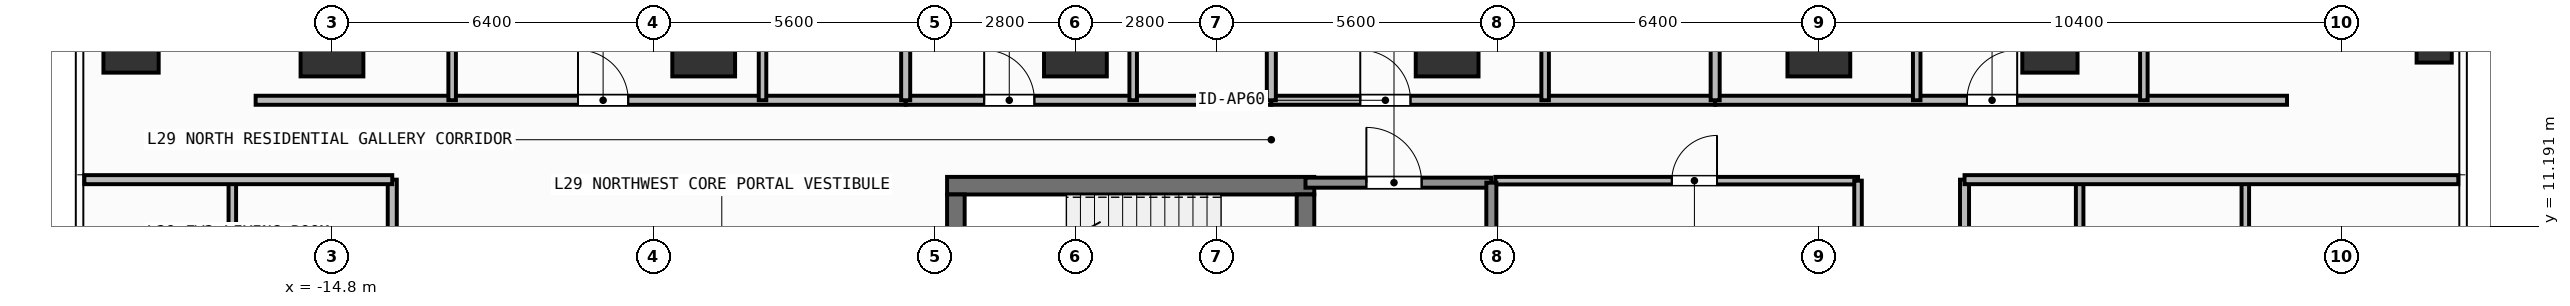
"""IFC4 building model, lengths in metres.
Left out: names, types, materials, properties, quantities, classifications, styles, units other than length and angle.
Written with IfcOpenShell. Run it as: python <this file> out.ifc"""

import sys

from ifc_helpers import new_model, si_unit, direction, frame, frame_2d, origin, origin_2d, place, context, subcontext, project, spatial, rectangle, hollow_rectangle, extrude, element, fill, save


model = new_model("IFC4")
c1 = context("Model", 3, precision=1e-05, world=origin(), true_north=direction((0.0, 1.0)))
c2 = subcontext(c1, "Body", "Model", "MODEL_VIEW")
j1 = project(units=[si_unit("LENGTHUNIT", "METRE"), si_unit("PLANEANGLEUNIT", "RADIAN")], contexts=[c1])
p1 = place(None, origin())
s1 = spatial("IfcSite", under=j1, at=p1, CompositionType="ELEMENT")
p2 = place(p1, origin())
s2 = spatial("IfcBuilding", under=s1, at=p2, CompositionType="ELEMENT")
p3 = place(p2, frame((0.0, 0.0, 117.3)))
s3 = spatial("IfcBuildingStorey", under=s2, at=p3, CompositionType="ELEMENT", Elevation=117.3)
p4 = place(p3, frame((-2.555, 12.0, 0.0), z_axis=(0.0, 0.0, 1.0), x_axis=(1.0, 0.0, 0.0)))
e1 = element("IfcWall", 1, at=p4, inside=s3, PredefinedType="SHEAR", context=c2, shape_type="SweptSolid", body=[
    extrude(rectangle(XDim=7.31, YDim=0.35, at=frame_2d((3.655, 0.0))), origin(), (0.0, 0.0, 1.0), 3.9),
])
p5 = place(p3, frame((-2.38, 8.9, 0.0), z_axis=(0.0, 0.0, 1.0), x_axis=(0.0, 1.0, 0.0)))
e2 = element("IfcWall", 2, at=p5, inside=s3, PredefinedType="SHEAR", context=c2, shape_type="SweptSolid", body=[
    extrude(rectangle(XDim=2.925, YDim=0.35, at=frame_2d((1.462, 0.0))), origin(), (0.0, 0.0, 1.0), 3.9),
])
p6 = place(p3, frame((4.58, 11.825, 0.0), z_axis=(0.0, 0.0, 1.0), x_axis=(0.0, -1.0, 0.0)))
e3 = element("IfcWall", 3, at=p6, inside=s3, PredefinedType="SHEAR", context=c2, shape_type="SweptSolid", body=[
    extrude(rectangle(XDim=2.925, YDim=0.35, at=frame_2d((1.462, 0.0))), origin(), (0.0, 0.0, 1.0), 3.9),
])
p7 = place(p6, frame((0.913, 0.0, 0.0)))
e4 = element("IfcOpeningElement", 4, at=p7, cuts=e3, PredefinedType="OPENING", context=c2, shape_type="SweptSolid", body=[
    extrude(rectangle(XDim=1.1, YDim=2.15, at=frame_2d((0.55, 1.075))), frame((0.0, 0.185, 0.0), z_axis=(0.0, -1.0, 0.0), x_axis=(1.0, 0.0, 0.0)), (0.0, 0.0, 1.0), 0.37),
])
for number, where, z_axis, x_axis in (
    (5, (-14.8, 14.8, 0.0), (0.0, 0.0, 1.0), (1.0, 0.0, 0.0)),
    (6, (-7.4, 14.8, 0.0), (0.0, 0.0, 1.0), (1.0, 0.0, 0.0)),
    (7, (0.0, 14.8, 0.0), (0.0, 0.0, 1.0), (1.0, 0.0, 0.0)),
    (8, (7.4, 14.8, 0.0), (0.0, 0.0, 1.0), (1.0, 0.0, 0.0)),
    (9, (14.8, 14.8, 0.0), (0.0, 0.0, 1.0), (1.0, 0.0, 0.0)),
):
    element("IfcColumn", number, at=place(p3, frame(where, z_axis=z_axis, x_axis=x_axis)), inside=s3, PredefinedType="COLUMN", context=c2, shape_type="SweptSolid", body=[
        extrude(rectangle(XDim=1.25, YDim=1.25, at=origin_2d()), origin(), (0.0, 0.0, 1.0), 3.9),
    ])
for number, where, z_axis, x_axis in (
    (10, (-18.8, 14.8, 0.0), (0.0, 0.0, 1.0), (1.0, 0.0, 0.0)),
    (11, (19.4, 14.8, 0.0), (0.0, 0.0, 1.0), (1.0, 0.0, 0.0)),
):
    element("IfcColumn", number, at=place(p3, frame(where, z_axis=z_axis, x_axis=x_axis)), inside=s3, PredefinedType="COLUMN", context=c2, shape_type="SweptSolid", body=[
        extrude(rectangle(XDim=1.1, YDim=1.1, at=origin_2d()), origin(), (0.0, 0.0, 1.0), 3.9),
    ])
p8 = place(p3, frame((27.05, 14.8, 0.0), z_axis=(0.0, 0.0, 1.0), x_axis=(1.0, 0.0, 0.0)))
e12 = element("IfcColumn", 12, at=p8, inside=s3, PredefinedType="COLUMN", context=c2, shape_type="SweptSolid", body=[
    extrude(hollow_rectangle(XDim=0.7, YDim=0.7, WallThickness=0.032, at=origin_2d()), origin(), (0.0, 0.0, 1.0), 3.9),
])
p9 = place(p3, frame((4.58, 12.06, 0.0), z_axis=(0.0, 0.0, 1.0), x_axis=(1.0, 0.0, 0.0)))
e13 = element("IfcWall", 13, at=p9, inside=s3, PredefinedType="SOLIDWALL", context=c2, shape_type="SweptSolid", body=[
    extrude(rectangle(XDim=3.7, YDim=0.2, at=frame_2d((1.85, 0.0))), origin(), (0.0, 0.0, 1.0), 3.68),
])
p10 = place(p9, frame((1.212, 0.0, 0.0)))
e14 = element("IfcOpeningElement", 14, at=p10, cuts=e13, PredefinedType="OPENING", context=c2, shape_type="SweptSolid", body=[
    extrude(rectangle(XDim=1.1, YDim=2.15, at=frame_2d((0.55, 1.075))), frame((0.0, 0.11, 0.0), z_axis=(0.0, -1.0, 0.0), x_axis=(1.0, 0.0, 0.0)), (0.0, 0.0, 1.0), 0.22),
])
p11 = place(p3, frame((8.36, 12.1, 0.0), z_axis=(0.0, 0.0, 1.0), x_axis=(1.0, 0.0, 0.0)))
e15 = element("IfcWall", 15, at=p11, inside=s3, PredefinedType="PARTITIONING", context=c2, shape_type="SweptSolid", body=[
    extrude(rectangle(XDim=7.22, YDim=0.15, at=frame_2d((3.61, 0.0))), origin(), (0.0, 0.0, 1.0), 3.68),
])
p12 = place(p11, frame((3.513, 0.0, 0.0)))
e16 = element("IfcOpeningElement", 16, at=p12, cuts=e15, PredefinedType="OPENING", context=c2, shape_type="SweptSolid", body=[
    extrude(rectangle(XDim=0.9, YDim=2.1, at=frame_2d((0.45, 1.05))), frame((0.0, 0.085, 0.0), z_axis=(0.0, -1.0, 0.0), x_axis=(1.0, 0.0, 0.0)), (0.0, 0.0, 1.0), 0.17),
])
p13 = place(p3, frame((-16.32, 13.7, 0.0), z_axis=(0.0, 0.0, 1.0), x_axis=(1.0, 0.0, 0.0)))
e17 = element("IfcWall", 17, at=p13, inside=s3, PredefinedType="PARTITIONING", context=c2, shape_type="SweptSolid", body=[
    extrude(rectangle(XDim=12.941, YDim=0.18, at=frame_2d((6.471, 0.0))), origin(), (0.0, 0.0, 1.0), 3.68),
])
p14 = place(p13, frame((6.417, 0.0, 0.0)))
e18 = element("IfcOpeningElement", 18, at=p14, cuts=e17, PredefinedType="OPENING", context=c2, shape_type="SweptSolid", body=[
    extrude(rectangle(XDim=1.0, YDim=2.2, at=frame_2d((0.5, 1.1))), frame((0.0, 0.1, 0.0), z_axis=(0.0, -1.0, 0.0), x_axis=(1.0, 0.0, 0.0)), (0.0, 0.0, 1.0), 0.2),
])
p15 = place(p3, frame((-12.408, 13.7, 0.0), z_axis=(0.0, 0.0, 1.0), x_axis=(0.0, 1.0, 0.0)))
e19 = element("IfcWall", 19, at=p15, inside=s3, PredefinedType="PARTITIONING", context=c2, shape_type="SweptSolid", body=[
    extrude(rectangle(XDim=6.664, YDim=0.15, at=frame_2d((3.332, 0.0))), origin(), (0.0, 0.0, 1.0), 3.68),
])
p16 = place(p15, frame((2.818, 0.0, 0.0)))
e20 = element("IfcOpeningElement", 20, at=p16, cuts=e19, PredefinedType="OPENING", context=c2, shape_type="SweptSolid", body=[
    extrude(rectangle(XDim=0.85, YDim=2.1, at=frame_2d((0.425, 1.05))), frame((0.0, 0.085, 0.0), z_axis=(0.0, -1.0, 0.0), x_axis=(1.0, 0.0, 0.0)), (0.0, 0.0, 1.0), 0.17),
])
p17 = place(p3, frame((-6.229, 13.7, 0.0), z_axis=(0.0, 0.0, 1.0), x_axis=(0.0, 1.0, 0.0)))
e21 = element("IfcWall", 21, at=p17, inside=s3, PredefinedType="PARTITIONING", context=c2, shape_type="SweptSolid", body=[
    extrude(rectangle(XDim=8.043, YDim=0.15, at=frame_2d((4.021, 0.0))), origin(), (0.0, 0.0, 1.0), 3.68),
])
p18 = place(p17, frame((3.685, 0.0, 0.0)))
e22 = element("IfcOpeningElement", 22, at=p18, cuts=e21, PredefinedType="OPENING", context=c2, shape_type="SweptSolid", body=[
    extrude(rectangle(XDim=0.85, YDim=2.1, at=frame_2d((0.425, 1.05))), frame((0.0, 0.085, 0.0), z_axis=(0.0, -1.0, 0.0), x_axis=(1.0, 0.0, 0.0)), (0.0, 0.0, 1.0), 0.17),
])
p19 = place(p3, frame((-3.379, 13.7, 0.0), z_axis=(0.0, 0.0, 1.0), x_axis=(1.0, 0.0, 0.0)))
e23 = element("IfcWall", 23, at=p19, inside=s3, PredefinedType="PARTITIONING", context=c2, shape_type="SweptSolid", body=[
    extrude(rectangle(XDim=7.279, YDim=0.18, at=frame_2d((3.639, 0.0))), origin(), (0.0, 0.0, 1.0), 3.68),
])
p20 = place(p19, frame((1.562, 0.0, 0.0)))
e24 = element("IfcOpeningElement", 24, at=p20, cuts=e23, PredefinedType="OPENING", context=c2, shape_type="SweptSolid", body=[
    extrude(rectangle(XDim=1.0, YDim=2.2, at=frame_2d((0.5, 1.1))), frame((0.0, 0.1, 0.0), z_axis=(0.0, -1.0, 0.0), x_axis=(1.0, 0.0, 0.0)), (0.0, 0.0, 1.0), 0.2),
])
p21 = place(p3, frame((1.15, 13.7, 0.0), z_axis=(0.0, 0.0, 1.0), x_axis=(0.0, 1.0, 0.0)))
e25 = element("IfcWall", 25, at=p21, inside=s3, PredefinedType="PARTITIONING", context=c2, shape_type="SweptSolid", body=[
    extrude(rectangle(XDim=6.32, YDim=0.15, at=frame_2d((3.16, 0.0))), origin(), (0.0, 0.0, 1.0), 3.68),
])
p22 = place(p21, frame((2.646, 0.0, 0.0)))
e26 = element("IfcOpeningElement", 26, at=p22, cuts=e25, PredefinedType="OPENING", context=c2, shape_type="SweptSolid", body=[
    extrude(rectangle(XDim=0.85, YDim=2.1, at=frame_2d((0.425, 1.05))), frame((0.0, 0.085, 0.0), z_axis=(0.0, -1.0, 0.0), x_axis=(1.0, 0.0, 0.0)), (0.0, 0.0, 1.0), 0.17),
])
p23 = place(p3, frame((3.9, 13.7, 0.0), z_axis=(0.0, 0.0, 1.0), x_axis=(1.0, 0.0, 0.0)))
e27 = element("IfcWall", 27, at=p23, inside=s3, PredefinedType="PARTITIONING", context=c2, shape_type="SweptSolid", body=[
    extrude(rectangle(XDim=8.836, YDim=0.18, at=frame_2d((4.418, 0.0))), origin(), (0.0, 0.0, 1.0), 3.68),
])
p24 = place(p23, frame((1.771, 0.0, 0.0)))
e28 = element("IfcOpeningElement", 28, at=p24, cuts=e27, PredefinedType="OPENING", context=c2, shape_type="SweptSolid", body=[
    extrude(rectangle(XDim=1.0, YDim=2.2, at=frame_2d((0.5, 1.1))), frame((0.0, 0.1, 0.0), z_axis=(0.0, -1.0, 0.0), x_axis=(1.0, 0.0, 0.0)), (0.0, 0.0, 1.0), 0.2),
])
p25 = place(p3, frame((9.351, 13.7, 0.0), z_axis=(0.0, 0.0, 1.0), x_axis=(0.0, 1.0, 0.0)))
e29 = element("IfcWall", 29, at=p25, inside=s3, PredefinedType="PARTITIONING", context=c2, shape_type="SweptSolid", body=[
    extrude(rectangle(XDim=6.32, YDim=0.15, at=frame_2d((3.16, 0.0))), origin(), (0.0, 0.0, 1.0), 3.68),
])
p26 = place(p25, frame((2.646, 0.0, 0.0)))
e30 = element("IfcOpeningElement", 30, at=p26, cuts=e29, PredefinedType="OPENING", context=c2, shape_type="SweptSolid", body=[
    extrude(rectangle(XDim=0.85, YDim=2.1, at=frame_2d((0.425, 1.05))), frame((0.0, 0.085, 0.0), z_axis=(0.0, -1.0, 0.0), x_axis=(1.0, 0.0, 0.0)), (0.0, 0.0, 1.0), 0.17),
])
p27 = place(p3, frame((12.736, 13.7, 0.0), z_axis=(0.0, 0.0, 1.0), x_axis=(1.0, 0.0, 0.0)))
e31 = element("IfcWall", 31, at=p27, inside=s3, PredefinedType="PARTITIONING", context=c2, shape_type="SweptSolid", body=[
    extrude(rectangle(XDim=11.384, YDim=0.18, at=frame_2d((5.692, 0.0))), origin(), (0.0, 0.0, 1.0), 3.68),
])
p28 = place(p27, frame((5.012, 0.0, 0.0)))
e32 = element("IfcOpeningElement", 32, at=p28, cuts=e31, PredefinedType="OPENING", context=c2, shape_type="SweptSolid", body=[
    extrude(rectangle(XDim=1.0, YDim=2.2, at=frame_2d((0.5, 1.1))), frame((0.0, 0.1, 0.0), z_axis=(0.0, -1.0, 0.0), x_axis=(1.0, 0.0, 0.0)), (0.0, 0.0, 1.0), 0.2),
])
p29 = place(p3, frame((16.748, 13.7, 0.0), z_axis=(0.0, 0.0, 1.0), x_axis=(0.0, 1.0, 0.0)))
e33 = element("IfcWall", 33, at=p29, inside=s3, PredefinedType="PARTITIONING", context=c2, shape_type="SweptSolid", body=[
    extrude(rectangle(XDim=6.664, YDim=0.15, at=frame_2d((3.332, 0.0))), origin(), (0.0, 0.0, 1.0), 3.68),
])
p30 = place(p29, frame((2.818, 0.0, 0.0)))
e34 = element("IfcOpeningElement", 34, at=p30, cuts=e33, PredefinedType="OPENING", context=c2, shape_type="SweptSolid", body=[
    extrude(rectangle(XDim=0.85, YDim=2.1, at=frame_2d((0.425, 1.05))), frame((0.0, 0.085, 0.0), z_axis=(0.0, -1.0, 0.0), x_axis=(1.0, 0.0, 0.0)), (0.0, 0.0, 1.0), 0.17),
])
p31 = place(p3, frame((21.27, 13.7, 0.0), z_axis=(0.0, 0.0, 1.0), x_axis=(0.0, 1.0, 0.0)))
e35 = element("IfcWall", 35, at=p31, inside=s3, PredefinedType="PARTITIONING", context=c2, shape_type="SweptSolid", body=[
    extrude(rectangle(XDim=8.043, YDim=0.15, at=frame_2d((4.021, 0.0))), origin(), (0.0, 0.0, 1.0), 3.68),
])
p32 = place(p31, frame((3.685, 0.0, 0.0)))
e36 = element("IfcOpeningElement", 36, at=p32, cuts=e35, PredefinedType="OPENING", context=c2, shape_type="SweptSolid", body=[
    extrude(rectangle(XDim=0.85, YDim=2.1, at=frame_2d((0.425, 1.05))), frame((0.0, 0.085, 0.0), z_axis=(0.0, -1.0, 0.0), x_axis=(1.0, 0.0, 0.0)), (0.0, 0.0, 1.0), 0.17),
])
p33 = place(p3, frame((-13.6, 1.018, 0.0), z_axis=(0.0, 0.0, 1.0), x_axis=(0.0, 1.0, 0.0)))
e37 = element("IfcWall", 37, at=p33, inside=s3, PredefinedType="PARTITIONING", context=c2, shape_type="SweptSolid", body=[
    extrude(rectangle(XDim=11.102, YDim=0.18, at=frame_2d((5.551, 0.0))), origin(), (0.0, 0.0, 1.0), 3.68),
])
p34 = place(p33, frame((4.606, 0.0, 0.0)))
e38 = element("IfcOpeningElement", 38, at=p34, cuts=e37, PredefinedType="OPENING", context=c2, shape_type="SweptSolid", body=[
    extrude(rectangle(XDim=1.0, YDim=2.2, at=frame_2d((0.5, 1.1))), frame((0.0, 0.1, 0.0), z_axis=(0.0, -1.0, 0.0), x_axis=(1.0, 0.0, 0.0)), (0.0, 0.0, 1.0), 0.2),
])
p35 = place(p3, frame((17.7, -12.12, 0.0), z_axis=(0.0, 0.0, 1.0), x_axis=(0.0, 1.0, 0.0)))
e39 = element("IfcWall", 39, at=p35, inside=s3, PredefinedType="PARTITIONING", context=c2, shape_type="SweptSolid", body=[
    extrude(rectangle(XDim=24.24, YDim=0.18, at=frame_2d((12.12, 0.0))), origin(), (0.0, 0.0, 1.0), 3.68),
])
p36 = place(p35, frame((11.62, 0.0, 0.0)))
e40 = element("IfcOpeningElement", 40, at=p36, cuts=e39, PredefinedType="OPENING", context=c2, shape_type="SweptSolid", body=[
    extrude(rectangle(XDim=1.0, YDim=2.2, at=frame_2d((0.5, 1.1))), frame((0.0, 0.1, 0.0), z_axis=(0.0, -1.0, 0.0), x_axis=(1.0, 0.0, 0.0)), (0.0, 0.0, 1.0), 0.2),
])
p37 = place(p3, frame((8.28, 8.875, 0.0), z_axis=(0.0, 0.0, 1.0), x_axis=(0.0, 1.0, 0.0)))
e41 = element("IfcWall", 41, at=p37, inside=s3, PredefinedType="SOLIDWALL", context=c2, shape_type="SweptSolid", body=[
    extrude(rectangle(XDim=3.185, YDim=0.2, at=frame_2d((1.593, 0.0))), origin(), (0.0, 0.0, 1.0), 3.68),
])
p38 = place(p3, frame((15.58, 5.85, 0.0), z_axis=(0.0, 0.0, 1.0), x_axis=(0.0, 1.0, 0.0)))
e42 = element("IfcWall", 42, at=p38, inside=s3, PredefinedType="PARTITIONING", context=c2, shape_type="SweptSolid", body=[
    extrude(rectangle(XDim=6.25, YDim=0.15, at=frame_2d((3.125, 0.0))), origin(), (0.0, 0.0, 1.0), 3.68),
])
for number, where, z_axis, x_axis in (
    (43, (-3.379, 13.7, 0.0), (0.0, 0.0, 1.0), (0.0, 1.0, 0.0)),
    (44, (3.9, 13.7, 0.0), (0.0, 0.0, 1.0), (0.0, 1.0, 0.0)),
    (45, (12.736, 13.7, 0.0), (0.0, 0.0, 1.0), (0.0, 1.0, 0.0)),
):
    element("IfcWall", number, at=place(p3, frame(where, z_axis=z_axis, x_axis=x_axis)), inside=s3, PredefinedType="PARTITIONING", context=c2, shape_type="SweptSolid", body=[
        extrude(rectangle(XDim=15.73, YDim=0.18, at=frame_2d((7.865, 0.0))), origin(), (0.0, 0.0, 1.0), 3.68),
    ])
p39 = place(p3, frame((-16.784, 8.394, 0.0), z_axis=(0.0, 0.0, 1.0), x_axis=(0.0, 1.0, 0.0)))
e46 = element("IfcWall", 46, at=p39, inside=s3, PredefinedType="PARTITIONING", context=c2, shape_type="SweptSolid", body=[
    extrude(rectangle(XDim=3.726, YDim=0.15, at=frame_2d((1.863, 0.0))), origin(), (0.0, 0.0, 1.0), 3.68),
])
p40 = place(p3, frame((-19.73, 12.12, 0.0), z_axis=(0.0, 0.0, 1.0), x_axis=(1.0, 0.0, 0.0)))
e47 = element("IfcWall", 47, at=p40, inside=s3, PredefinedType="PARTITIONING", context=c2, shape_type="SweptSolid", body=[
    extrude(rectangle(XDim=6.13, YDim=0.18, at=frame_2d((3.065, 0.0))), origin(), (0.0, 0.0, 1.0), 3.68),
])
for number, where, z_axis, x_axis in (
    (48, (19.992, 5.436, 0.0), (0.0, 0.0, 1.0), (0.0, 1.0, 0.0)),
    (49, (23.29, 5.436, 0.0), (0.0, 0.0, 1.0), (0.0, 1.0, 0.0)),
):
    element("IfcWall", number, at=place(p3, frame(where, z_axis=z_axis, x_axis=x_axis)), inside=s3, PredefinedType="PARTITIONING", context=c2, shape_type="SweptSolid", body=[
        extrude(rectangle(XDim=6.684, YDim=0.15, at=frame_2d((3.342, 0.0))), origin(), (0.0, 0.0, 1.0), 3.68),
    ])
p41 = place(p3, frame((17.7, 12.12, 0.0), z_axis=(0.0, 0.0, 1.0), x_axis=(1.0, 0.0, 0.0)))
e50 = element("IfcWall", 50, at=p41, inside=s3, PredefinedType="PARTITIONING", context=c2, shape_type="SweptSolid", body=[
    extrude(rectangle(XDim=9.83, YDim=0.18, at=frame_2d((4.915, 0.0))), origin(), (0.0, 0.0, 1.0), 3.68),
])
p42 = place(p10, origin())
e51 = element("IfcDoor", 51, at=p42, inside=s3, OperationType="SINGLE_SWING_LEFT", PredefinedType="DOOR", context=c2, shape_type="SweptSolid", body=[
    extrude(rectangle(XDim=1.1, YDim=2.15, at=frame_2d((0.55, 1.075))), frame((0.0, 0.025, 0.0), z_axis=(0.0, -1.0, 0.0), x_axis=(1.0, 0.0, 0.0)), (0.0, 0.0, 1.0), 0.05),
])
fill(e14, e51)
p43 = place(p12, origin())
e52 = element("IfcDoor", 52, at=p43, inside=s3, OperationType="SINGLE_SWING_RIGHT", PredefinedType="DOOR", context=c2, shape_type="SweptSolid", body=[
    extrude(rectangle(XDim=0.9, YDim=2.1, at=frame_2d((0.45, 1.05))), frame((0.0, 0.025, 0.0), z_axis=(0.0, -1.0, 0.0), x_axis=(1.0, 0.0, 0.0)), (0.0, 0.0, 1.0), 0.05),
])
fill(e16, e52)
p44 = place(p14, origin())
e53 = element("IfcDoor", 53, at=p44, inside=s3, OperationType="SINGLE_SWING_LEFT", PredefinedType="DOOR", context=c2, shape_type="SweptSolid", body=[
    extrude(rectangle(XDim=1.0, YDim=2.2, at=frame_2d((0.5, 1.1))), frame((0.0, 0.025, 0.0), z_axis=(0.0, -1.0, 0.0), x_axis=(1.0, 0.0, 0.0)), (0.0, 0.0, 1.0), 0.05),
])
fill(e18, e53)
p45 = place(p20, origin())
e54 = element("IfcDoor", 54, at=p45, inside=s3, OperationType="SINGLE_SWING_LEFT", PredefinedType="DOOR", context=c2, shape_type="SweptSolid", body=[
    extrude(rectangle(XDim=1.0, YDim=2.2, at=frame_2d((0.5, 1.1))), frame((0.0, 0.025, 0.0), z_axis=(0.0, -1.0, 0.0), x_axis=(1.0, 0.0, 0.0)), (0.0, 0.0, 1.0), 0.05),
])
fill(e24, e54)
p46 = place(p24, origin())
e55 = element("IfcDoor", 55, at=p46, inside=s3, OperationType="SINGLE_SWING_LEFT", PredefinedType="DOOR", context=c2, shape_type="SweptSolid", body=[
    extrude(rectangle(XDim=1.0, YDim=2.2, at=frame_2d((0.5, 1.1))), frame((0.0, 0.025, 0.0), z_axis=(0.0, -1.0, 0.0), x_axis=(1.0, 0.0, 0.0)), (0.0, 0.0, 1.0), 0.05),
])
fill(e28, e55)
p47 = place(p28, origin())
e56 = element("IfcDoor", 56, at=p47, inside=s3, OperationType="SINGLE_SWING_RIGHT", PredefinedType="DOOR", context=c2, shape_type="SweptSolid", body=[
    extrude(rectangle(XDim=1.0, YDim=2.2, at=frame_2d((0.5, 1.1))), frame((0.0, 0.025, 0.0), z_axis=(0.0, -1.0, 0.0), x_axis=(1.0, 0.0, 0.0)), (0.0, 0.0, 1.0), 0.05),
])
fill(e32, e56)
save(model, sys.argv[1])
